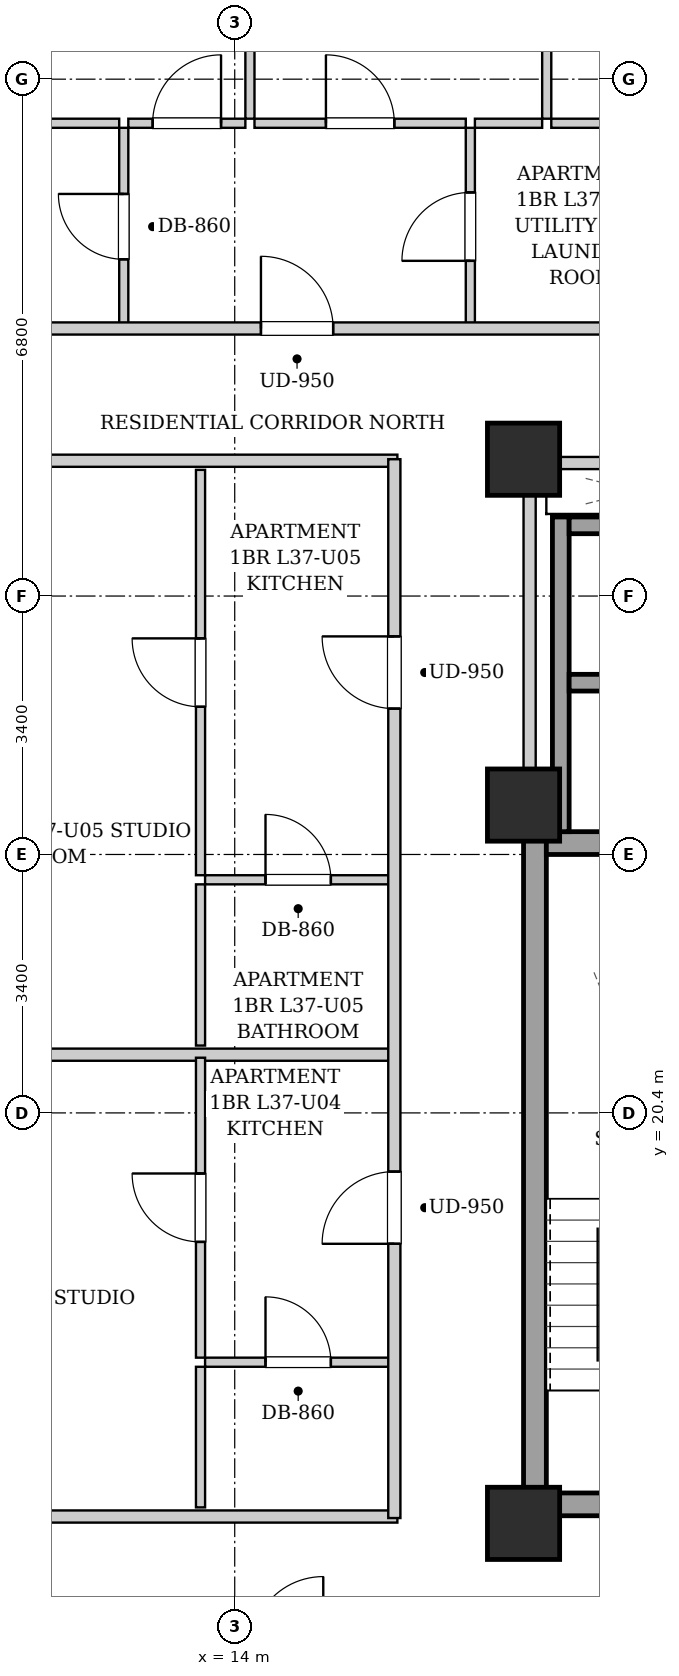
"""IFC4 building model, lengths in metres.
Left out: names, types, materials, properties, quantities, classifications, styles, units other than length and angle.
Written with IfcOpenShell. Run it as: python <this file> out.ifc"""

import sys

from ifc_helpers import new_model, si_unit, direction, frame, frame_2d, origin, origin_2d, place, context, subcontext, project, spatial, rectangle, extrude, element, fill, save


model = new_model("IFC4")
c1 = context("Model", 3, precision=1e-05, world=origin(), true_north=direction((0.0, 1.0)))
c2 = subcontext(c1, "Body", "Model", "MODEL_VIEW")
j1 = project(units=[si_unit("LENGTHUNIT", "METRE"), si_unit("PLANEANGLEUNIT", "RADIAN")], contexts=[c1])
p1 = place(None, origin())
s1 = spatial("IfcSite", under=j1, at=p1, CompositionType="ELEMENT")
p2 = place(p1, origin())
s2 = spatial("IfcBuilding", under=s1, at=p2, CompositionType="ELEMENT")
p3 = place(p2, frame((0.0, 0.0, 130.9)))
s3 = spatial("IfcBuildingStorey", under=s2, at=p3, CompositionType="ELEMENT", Elevation=130.9)
for number, where, z_axis, x_axis in (
    (1, (17.8, 15.0, 0.0), (0.0, 0.0, 1.0), (1.0, 0.0, 0.0)),
    (2, (17.8, 29.0, 0.0), (0.0, 0.0, 1.0), (1.0, 0.0, 0.0)),
    (3, (17.8, 24.45, 0.0), (0.0, 0.0, 1.0), (1.0, 0.0, 0.0)),
):
    element("IfcColumn", number, at=place(p3, frame(where, z_axis=z_axis, x_axis=x_axis)), inside=s3, PredefinedType="COLUMN", context=c2, shape_type="SweptSolid", body=[
        extrude(rectangle(XDim=0.95, YDim=0.95, at=origin_2d()), origin(), (0.0, 0.0, 1.0), 3.25),
    ])
p4 = place(p3, frame((17.95, 15.1, 0.0), z_axis=(0.0, 0.0, 1.0), x_axis=(0.0, 1.0, 0.0)))
e4 = element("IfcWall", 4, at=p4, inside=s3, PredefinedType="SHEAR", context=c2, shape_type="SweptSolid", body=[
    extrude(rectangle(XDim=9.0, YDim=0.3, at=frame_2d((4.5, 0.0))), origin(), (0.0, 0.0, 1.0), 2.99),
])
p5 = place(p3, frame((18.1, 23.95, 0.0), z_axis=(0.0, 0.0, 1.0), x_axis=(1.0, 0.0, 0.0)))
e5 = element("IfcWall", 5, at=p5, inside=s3, PredefinedType="SHEAR", context=c2, shape_type="SweptSolid", body=[
    extrude(rectangle(XDim=2.85, YDim=0.3, at=frame_2d((1.425, 0.0))), origin(), (0.0, 0.0, 1.0), 2.99),
])
p6 = place(p3, frame((18.1, 15.25, 0.0), z_axis=(0.0, 0.0, 1.0), x_axis=(1.0, 0.0, 0.0)))
e6 = element("IfcWall", 6, at=p6, inside=s3, PredefinedType="SHEAR", context=c2, shape_type="SweptSolid", body=[
    extrude(rectangle(XDim=2.85, YDim=0.3, at=frame_2d((1.425, 0.0))), origin(), (0.0, 0.0, 1.0), 2.99),
])
p7 = place(p6, frame((0.86, 0.0, 0.0)))
e7 = element("IfcOpeningElement", 7, at=p7, cuts=e6, PredefinedType="OPENING", context=c2, shape_type="SweptSolid", body=[
    extrude(rectangle(XDim=1.1, YDim=2.05, at=frame_2d((0.55, 1.025))), frame((0.0, 0.16, 0.0), z_axis=(0.0, -1.0, 0.0), x_axis=(1.0, 0.0, 0.0)), (0.0, 0.0, 1.0), 0.32),
])
p8 = place(p3, frame((18.29, 24.1, 0.0), z_axis=(0.0, 0.0, 1.0), x_axis=(0.0, 1.0, 0.0)))
e8 = element("IfcWall", 8, at=p8, inside=s3, PredefinedType="SHEAR", context=c2, shape_type="SweptSolid", body=[
    extrude(rectangle(XDim=4.14, YDim=0.22, at=frame_2d((2.07, 0.0))), origin(), (0.0, 0.0, 1.0), 2.99),
])
for number, where, z_axis, x_axis in (
    (9, (18.4, 26.06, 0.0), (0.0, 0.0, 1.0), (1.0, 0.0, 0.0)),
    (10, (18.4, 28.13, 0.0), (0.0, 0.0, 1.0), (1.0, 0.0, 0.0)),
):
    element("IfcWall", number, at=place(p3, frame(where, z_axis=z_axis, x_axis=x_axis)), inside=s3, PredefinedType="SHEAR", context=c2, shape_type="SweptSolid", body=[
        extrude(rectangle(XDim=1.9, YDim=0.22, at=frame_2d((0.95, 0.0))), origin(), (0.0, 0.0, 1.0), 2.99),
    ])
p9 = place(p3, frame((17.88, 24.12, 0.0), z_axis=(0.0, 0.0, 1.0), x_axis=(0.0, 1.0, 0.0)))
e11 = element("IfcWall", 11, at=p9, inside=s3, PredefinedType="PARTITIONING", context=c2, shape_type="SweptSolid", body=[
    extrude(rectangle(XDim=4.76, YDim=0.16, at=frame_2d((2.38, 0.0))), origin(), (0.0, 0.0, 1.0), 2.99),
])
p10 = place(p3, frame((17.96, 28.95, 0.0), z_axis=(0.0, 0.0, 1.0), x_axis=(1.0, 0.0, 0.0)))
e12 = element("IfcWall", 12, at=p10, inside=s3, PredefinedType="PARTITIONING", context=c2, shape_type="SweptSolid", body=[
    extrude(rectangle(XDim=4.29, YDim=0.16, at=frame_2d((2.145, 0.0))), origin(), (0.0, 0.0, 1.0), 2.426),
])
p11 = place(p10, frame((1.695, 0.0, 0.0)))
e13 = element("IfcOpeningElement", 13, at=p11, cuts=e12, PredefinedType="OPENING", context=c2, shape_type="SweptSolid", body=[
    extrude(rectangle(XDim=0.86, YDim=2.05, at=frame_2d((0.43, 1.025))), frame((0.0, 0.09, 0.0), z_axis=(0.0, -1.0, 0.0), x_axis=(1.0, 0.0, 0.0)), (0.0, 0.0, 1.0), 0.18),
])
for number, where, z_axis, x_axis in (
    (14, (7.78, 15.09, 0.0), (0.0, 0.0, 1.0), (1.0, 0.0, 0.0)),
    (15, (7.78, 28.98, 0.0), (0.0, 0.0, 1.0), (1.0, 0.0, 0.0)),
):
    element("IfcWall", number, at=place(p3, frame(where, z_axis=z_axis, x_axis=x_axis)), inside=s3, PredefinedType="PARTITIONING", context=c2, shape_type="SweptSolid", body=[
        extrude(rectangle(XDim=8.36, YDim=0.16, at=frame_2d((4.18, 0.0))), origin(), (0.0, 0.0, 1.0), 2.426),
    ])
p12 = place(p3, frame((12.54, 30.76, 0.0), z_axis=(0.0, 0.0, 1.0), x_axis=(0.0, 1.0, 0.0)))
e16 = element("IfcWall", 16, at=p12, inside=s3, PredefinedType="PARTITIONING", context=c2, shape_type="SweptSolid", body=[
    extrude(rectangle(XDim=2.6, YDim=0.12, at=frame_2d((1.3, 0.0))), origin(), (0.0, 0.0, 1.0), 2.99),
])
p13 = place(p12, frame((0.87, 0.0, 0.0)))
e17 = element("IfcOpeningElement", 17, at=p13, cuts=e16, PredefinedType="OPENING", context=c2, shape_type="SweptSolid", body=[
    extrude(rectangle(XDim=0.86, YDim=2.05, at=frame_2d((0.43, 1.025))), frame((0.0, 0.07, 0.0), z_axis=(0.0, -1.0, 0.0), x_axis=(1.0, 0.0, 0.0)), (0.0, 0.0, 1.0), 0.14),
])
p14 = place(p3, frame((10.08, 33.42, 0.0), z_axis=(0.0, 0.0, 1.0), x_axis=(1.0, 0.0, 0.0)))
e18 = element("IfcWall", 18, at=p14, inside=s3, PredefinedType="PARTITIONING", context=c2, shape_type="SweptSolid", body=[
    extrude(rectangle(XDim=2.4, YDim=0.12, at=frame_2d((1.2, 0.0))), origin(), (0.0, 0.0, 1.0), 2.99),
])
p15 = place(p3, frame((17.1, 30.76, 0.0), z_axis=(0.0, 0.0, 1.0), x_axis=(0.0, 1.0, 0.0)))
e19 = element("IfcWall", 19, at=p15, inside=s3, PredefinedType="PARTITIONING", context=c2, shape_type="SweptSolid", body=[
    extrude(rectangle(XDim=2.6, YDim=0.12, at=frame_2d((1.3, 0.0))), origin(), (0.0, 0.0, 1.0), 2.99),
])
p16 = place(p15, frame((0.85, 0.0, 0.0)))
e20 = element("IfcOpeningElement", 20, at=p16, cuts=e19, PredefinedType="OPENING", context=c2, shape_type="SweptSolid", body=[
    extrude(rectangle(XDim=0.9, YDim=2.05, at=frame_2d((0.45, 1.025))), frame((0.0, 0.07, 0.0), z_axis=(0.0, -1.0, 0.0), x_axis=(1.0, 0.0, 0.0)), (0.0, 0.0, 1.0), 0.14),
])
p17 = place(p3, frame((12.6, 33.42, 0.0), z_axis=(0.0, 0.0, 1.0), x_axis=(1.0, 0.0, 0.0)))
e21 = element("IfcWall", 21, at=p17, inside=s3, PredefinedType="PARTITIONING", context=c2, shape_type="SweptSolid", body=[
    extrude(rectangle(XDim=1.54, YDim=0.12, at=frame_2d((0.77, 0.0))), origin(), (0.0, 0.0, 1.0), 2.99),
])
p18 = place(p17, frame((0.32, 0.0, 0.0)))
e22 = element("IfcOpeningElement", 22, at=p18, cuts=e21, PredefinedType="OPENING", context=c2, shape_type="SweptSolid", body=[
    extrude(rectangle(XDim=0.9, YDim=2.05, at=frame_2d((0.45, 1.025))), frame((0.0, 0.07, 0.0), z_axis=(0.0, -1.0, 0.0), x_axis=(1.0, 0.0, 0.0)), (0.0, 0.0, 1.0), 0.14),
])
p19 = place(p3, frame((14.26, 33.42, 0.0), z_axis=(0.0, 0.0, 1.0), x_axis=(1.0, 0.0, 0.0)))
e23 = element("IfcWall", 23, at=p19, inside=s3, PredefinedType="PARTITIONING", context=c2, shape_type="SweptSolid", body=[
    extrude(rectangle(XDim=2.78, YDim=0.12, at=frame_2d((1.39, 0.0))), origin(), (0.0, 0.0, 1.0), 2.99),
])
p20 = place(p19, frame((0.94, 0.0, 0.0)))
e24 = element("IfcOpeningElement", 24, at=p20, cuts=e23, PredefinedType="OPENING", context=c2, shape_type="SweptSolid", body=[
    extrude(rectangle(XDim=0.9, YDim=2.05, at=frame_2d((0.45, 1.025))), frame((0.0, 0.07, 0.0), z_axis=(0.0, -1.0, 0.0), x_axis=(1.0, 0.0, 0.0)), (0.0, 0.0, 1.0), 0.14),
])
p21 = place(p3, frame((17.16, 33.42, 0.0), z_axis=(0.0, 0.0, 1.0), x_axis=(1.0, 0.0, 0.0)))
e25 = element("IfcWall", 25, at=p21, inside=s3, PredefinedType="PARTITIONING", context=c2, shape_type="SweptSolid", body=[
    extrude(rectangle(XDim=0.885, YDim=0.12, at=frame_2d((0.442, 0.0))), origin(), (0.0, 0.0, 1.0), 2.99),
])
p22 = place(p3, frame((18.165, 33.42, 0.0), z_axis=(0.0, 0.0, 1.0), x_axis=(1.0, 0.0, 0.0)))
e26 = element("IfcWall", 26, at=p22, inside=s3, PredefinedType="PARTITIONING", context=c2, shape_type="SweptSolid", body=[
    extrude(rectangle(XDim=2.595, YDim=0.12, at=frame_2d((1.297, 0.0))), origin(), (0.0, 0.0, 1.0), 2.99),
])
p23 = place(p22, frame((0.847, 0.0, 0.0)))
e27 = element("IfcOpeningElement", 27, at=p23, cuts=e26, PredefinedType="OPENING", context=c2, shape_type="SweptSolid", body=[
    extrude(rectangle(XDim=0.9, YDim=2.05, at=frame_2d((0.45, 1.025))), frame((0.0, 0.07, 0.0), z_axis=(0.0, -1.0, 0.0), x_axis=(1.0, 0.0, 0.0)), (0.0, 0.0, 1.0), 0.14),
])
p24 = place(p3, frame((14.2, 33.48, 0.0), z_axis=(0.0, 0.0, 1.0), x_axis=(0.0, 1.0, 0.0)))
e28 = element("IfcWall", 28, at=p24, inside=s3, PredefinedType="PARTITIONING", context=c2, shape_type="SweptSolid", body=[
    extrude(rectangle(XDim=9.54, YDim=0.12, at=frame_2d((4.77, 0.0))), origin(), (0.0, 0.0, 1.0), 2.99),
])
p25 = place(p24, frame((4.305, 0.0, 0.0)))
e29 = element("IfcOpeningElement", 29, at=p25, cuts=e28, PredefinedType="OPENING", context=c2, shape_type="SweptSolid", body=[
    extrude(rectangle(XDim=0.9, YDim=2.05, at=frame_2d((0.45, 1.025))), frame((0.0, 0.07, 0.0), z_axis=(0.0, -1.0, 0.0), x_axis=(1.0, 0.0, 0.0)), (0.0, 0.0, 1.0), 0.14),
])
p26 = place(p3, frame((18.105, 33.48, 0.0), z_axis=(0.0, 0.0, 1.0), x_axis=(0.0, 1.0, 0.0)))
e30 = element("IfcWall", 30, at=p26, inside=s3, PredefinedType="PARTITIONING", context=c2, shape_type="SweptSolid", body=[
    extrude(rectangle(XDim=9.54, YDim=0.12, at=frame_2d((4.77, 0.0))), origin(), (0.0, 0.0, 1.0), 2.99),
])
p27 = place(p26, frame((4.305, 0.0, 0.0)))
e31 = element("IfcOpeningElement", 31, at=p27, cuts=e30, PredefinedType="OPENING", context=c2, shape_type="SweptSolid", body=[
    extrude(rectangle(XDim=0.9, YDim=2.05, at=frame_2d((0.45, 1.025))), frame((0.0, 0.07, 0.0), z_axis=(0.0, -1.0, 0.0), x_axis=(1.0, 0.0, 0.0)), (0.0, 0.0, 1.0), 0.14),
])
p28 = place(p3, frame((7.78, 21.166, 0.0), z_axis=(0.0, 0.0, 1.0), x_axis=(1.0, 0.0, 0.0)))
e32 = element("IfcWall", 32, at=p28, inside=s3, PredefinedType="PARTITIONING", context=c2, shape_type="SweptSolid", body=[
    extrude(rectangle(XDim=8.28, YDim=0.16, at=frame_2d((4.14, 0.0))), origin(), (0.0, 0.0, 1.0), 2.99),
])
p29 = place(p3, frame((13.61, 17.12, 0.0), z_axis=(0.0, 0.0, 1.0), x_axis=(1.0, 0.0, 0.0)))
e33 = element("IfcWall", 33, at=p29, inside=s3, PredefinedType="PARTITIONING", context=c2, shape_type="SweptSolid", body=[
    extrude(rectangle(XDim=2.45, YDim=0.12, at=frame_2d((1.225, 0.0))), origin(), (0.0, 0.0, 1.0), 2.99),
])
p30 = place(p29, frame((0.795, 0.0, 0.0)))
e34 = element("IfcOpeningElement", 34, at=p30, cuts=e33, PredefinedType="OPENING", context=c2, shape_type="SweptSolid", body=[
    extrude(rectangle(XDim=0.86, YDim=2.05, at=frame_2d((0.43, 1.025))), frame((0.0, 0.07, 0.0), z_axis=(0.0, -1.0, 0.0), x_axis=(1.0, 0.0, 0.0)), (0.0, 0.0, 1.0), 0.14),
])
p31 = place(p3, frame((13.55, 15.21, 0.0), z_axis=(0.0, 0.0, 1.0), x_axis=(0.0, 1.0, 0.0)))
e35 = element("IfcWall", 35, at=p31, inside=s3, PredefinedType="PARTITIONING", context=c2, shape_type="SweptSolid", body=[
    extrude(rectangle(XDim=1.85, YDim=0.12, at=frame_2d((0.925, 0.0))), origin(), (0.0, 0.0, 1.0), 2.99),
])
p32 = place(p3, frame((13.55, 17.18, 0.0), z_axis=(0.0, 0.0, 1.0), x_axis=(0.0, 1.0, 0.0)))
e36 = element("IfcWall", 36, at=p32, inside=s3, PredefinedType="PARTITIONING", context=c2, shape_type="SweptSolid", body=[
    extrude(rectangle(XDim=3.946, YDim=0.12, at=frame_2d((1.973, 0.0))), origin(), (0.0, 0.0, 1.0), 2.99),
])
p33 = place(p32, frame((1.523, 0.0, 0.0)))
e37 = element("IfcOpeningElement", 37, at=p33, cuts=e36, PredefinedType="OPENING", context=c2, shape_type="SweptSolid", body=[
    extrude(rectangle(XDim=0.9, YDim=2.05, at=frame_2d((0.45, 1.025))), frame((0.0, 0.07, 0.0), z_axis=(0.0, -1.0, 0.0), x_axis=(1.0, 0.0, 0.0)), (0.0, 0.0, 1.0), 0.14),
])
p34 = place(p3, frame((13.61, 23.467, 0.0), z_axis=(0.0, 0.0, 1.0), x_axis=(1.0, 0.0, 0.0)))
e38 = element("IfcWall", 38, at=p34, inside=s3, PredefinedType="PARTITIONING", context=c2, shape_type="SweptSolid", body=[
    extrude(rectangle(XDim=2.45, YDim=0.12, at=frame_2d((1.225, 0.0))), origin(), (0.0, 0.0, 1.0), 2.99),
])
p35 = place(p34, frame((0.795, 0.0, 0.0)))
e39 = element("IfcOpeningElement", 39, at=p35, cuts=e38, PredefinedType="OPENING", context=c2, shape_type="SweptSolid", body=[
    extrude(rectangle(XDim=0.86, YDim=2.05, at=frame_2d((0.43, 1.025))), frame((0.0, 0.07, 0.0), z_axis=(0.0, -1.0, 0.0), x_axis=(1.0, 0.0, 0.0)), (0.0, 0.0, 1.0), 0.14),
])
p36 = place(p3, frame((13.55, 21.286, 0.0), z_axis=(0.0, 0.0, 1.0), x_axis=(0.0, 1.0, 0.0)))
e40 = element("IfcWall", 40, at=p36, inside=s3, PredefinedType="PARTITIONING", context=c2, shape_type="SweptSolid", body=[
    extrude(rectangle(XDim=2.121, YDim=0.12, at=frame_2d((1.061, 0.0))), origin(), (0.0, 0.0, 1.0), 2.99),
])
p37 = place(p3, frame((13.55, 23.527, 0.0), z_axis=(0.0, 0.0, 1.0), x_axis=(0.0, 1.0, 0.0)))
e41 = element("IfcWall", 41, at=p37, inside=s3, PredefinedType="PARTITIONING", context=c2, shape_type="SweptSolid", body=[
    extrude(rectangle(XDim=5.333, YDim=0.12, at=frame_2d((2.667, 0.0))), origin(), (0.0, 0.0, 1.0), 2.99),
])
p38 = place(p37, frame((2.216, 0.0, 0.0)))
e42 = element("IfcOpeningElement", 42, at=p38, cuts=e41, PredefinedType="OPENING", context=c2, shape_type="SweptSolid", body=[
    extrude(rectangle(XDim=0.9, YDim=2.05, at=frame_2d((0.45, 1.025))), frame((0.0, 0.07, 0.0), z_axis=(0.0, -1.0, 0.0), x_axis=(1.0, 0.0, 0.0)), (0.0, 0.0, 1.0), 0.14),
])
p39 = place(p3, frame((10.05, 30.72, 0.0), z_axis=(0.0, 0.0, 1.0), x_axis=(1.0, 0.0, 0.0)))
e43 = element("IfcWall", 43, at=p39, inside=s3, PredefinedType="PARTITIONING", context=c2, shape_type="SweptSolid", body=[
    extrude(rectangle(XDim=27.7, YDim=0.16, at=frame_2d((13.85, 0.0))), origin(), (0.0, 0.0, 1.0), 2.99),
])
p40 = place(p39, frame((4.295, 0.0, 0.0)))
e44 = element("IfcOpeningElement", 44, at=p40, cuts=e43, PredefinedType="OPENING", context=c2, shape_type="SweptSolid", body=[
    extrude(rectangle(XDim=0.95, YDim=2.1, at=frame_2d((0.475, 1.05))), frame((0.0, 0.09, 0.0), z_axis=(0.0, -1.0, 0.0), x_axis=(1.0, 0.0, 0.0)), (0.0, 0.0, 1.0), 0.18),
])
p41 = place(p39, frame((23.785, 0.0, 0.0)))
e45 = element("IfcOpeningElement", 45, at=p41, cuts=e43, PredefinedType="OPENING", context=c2, shape_type="SweptSolid", body=[
    extrude(rectangle(XDim=0.95, YDim=2.1, at=frame_2d((0.475, 1.05))), frame((0.0, 0.09, 0.0), z_axis=(0.0, -1.0, 0.0), x_axis=(1.0, 0.0, 0.0)), (0.0, 0.0, 1.0), 0.18),
])
p42 = place(p3, frame((16.1, 15.07, 0.0), z_axis=(0.0, 0.0, 1.0), x_axis=(0.0, 1.0, 0.0)))
e46 = element("IfcWall", 46, at=p42, inside=s3, PredefinedType="PARTITIONING", context=c2, shape_type="SweptSolid", body=[
    extrude(rectangle(XDim=13.93, YDim=0.16, at=frame_2d((6.965, 0.0))), origin(), (0.0, 0.0, 1.0), 2.99),
])
p43 = place(p42, frame((3.608, 0.0, 0.0)))
e47 = element("IfcOpeningElement", 47, at=p43, cuts=e46, PredefinedType="OPENING", context=c2, shape_type="SweptSolid", body=[
    extrude(rectangle(XDim=0.95, YDim=2.1, at=frame_2d((0.475, 1.05))), frame((0.0, 0.09, 0.0), z_axis=(0.0, -1.0, 0.0), x_axis=(1.0, 0.0, 0.0)), (0.0, 0.0, 1.0), 0.18),
])
p44 = place(p42, frame((10.649, 0.0, 0.0)))
e48 = element("IfcOpeningElement", 48, at=p44, cuts=e46, PredefinedType="OPENING", context=c2, shape_type="SweptSolid", body=[
    extrude(rectangle(XDim=0.95, YDim=2.1, at=frame_2d((0.475, 1.05))), frame((0.0, 0.09, 0.0), z_axis=(0.0, -1.0, 0.0), x_axis=(1.0, 0.0, 0.0)), (0.0, 0.0, 1.0), 0.18),
])
p45 = place(p13, origin())
e49 = element("IfcDoor", 49, at=p45, inside=s3, OperationType="SINGLE_SWING_RIGHT", PredefinedType="DOOR", context=c2, shape_type="SweptSolid", body=[
    extrude(rectangle(XDim=0.86, YDim=2.05, at=frame_2d((0.43, 1.025))), frame((0.0, 0.025, 0.0), z_axis=(0.0, -1.0, 0.0), x_axis=(1.0, 0.0, 0.0)), (0.0, 0.0, 1.0), 0.05),
])
fill(e17, e49)
p46 = place(p16, origin())
e50 = element("IfcDoor", 50, at=p46, inside=s3, OperationType="SINGLE_SWING_LEFT", PredefinedType="DOOR", context=c2, shape_type="SweptSolid", body=[
    extrude(rectangle(XDim=0.9, YDim=2.05, at=frame_2d((0.45, 1.025))), frame((0.0, 0.025, 0.0), z_axis=(0.0, -1.0, 0.0), x_axis=(1.0, 0.0, 0.0)), (0.0, 0.0, 1.0), 0.05),
])
fill(e20, e50)
p47 = place(p18, origin())
e51 = element("IfcDoor", 51, at=p47, inside=s3, OperationType="SINGLE_SWING_RIGHT", PredefinedType="DOOR", context=c2, shape_type="SweptSolid", body=[
    extrude(rectangle(XDim=0.9, YDim=2.05, at=frame_2d((0.45, 1.025))), frame((0.0, 0.025, 0.0), z_axis=(0.0, -1.0, 0.0), x_axis=(1.0, 0.0, 0.0)), (0.0, 0.0, 1.0), 0.05),
])
fill(e22, e51)
p48 = place(p20, origin())
e52 = element("IfcDoor", 52, at=p48, inside=s3, OperationType="SINGLE_SWING_LEFT", PredefinedType="DOOR", context=c2, shape_type="SweptSolid", body=[
    extrude(rectangle(XDim=0.9, YDim=2.05, at=frame_2d((0.45, 1.025))), frame((0.0, 0.025, 0.0), z_axis=(0.0, -1.0, 0.0), x_axis=(1.0, 0.0, 0.0)), (0.0, 0.0, 1.0), 0.05),
])
fill(e24, e52)
p49 = place(p30, origin())
e53 = element("IfcDoor", 53, at=p49, inside=s3, OperationType="SINGLE_SWING_LEFT", PredefinedType="DOOR", context=c2, shape_type="SweptSolid", body=[
    extrude(rectangle(XDim=0.86, YDim=2.05, at=frame_2d((0.43, 1.025))), frame((0.0, 0.025, 0.0), z_axis=(0.0, -1.0, 0.0), x_axis=(1.0, 0.0, 0.0)), (0.0, 0.0, 1.0), 0.05),
])
fill(e34, e53)
p50 = place(p33, origin())
e54 = element("IfcDoor", 54, at=p50, inside=s3, OperationType="SINGLE_SWING_RIGHT", PredefinedType="DOOR", context=c2, shape_type="SweptSolid", body=[
    extrude(rectangle(XDim=0.9, YDim=2.05, at=frame_2d((0.45, 1.025))), frame((0.0, 0.025, 0.0), z_axis=(0.0, -1.0, 0.0), x_axis=(1.0, 0.0, 0.0)), (0.0, 0.0, 1.0), 0.05),
])
fill(e37, e54)
p51 = place(p35, origin())
e55 = element("IfcDoor", 55, at=p51, inside=s3, OperationType="SINGLE_SWING_LEFT", PredefinedType="DOOR", context=c2, shape_type="SweptSolid", body=[
    extrude(rectangle(XDim=0.86, YDim=2.05, at=frame_2d((0.43, 1.025))), frame((0.0, 0.025, 0.0), z_axis=(0.0, -1.0, 0.0), x_axis=(1.0, 0.0, 0.0)), (0.0, 0.0, 1.0), 0.05),
])
fill(e39, e55)
p52 = place(p38, origin())
e56 = element("IfcDoor", 56, at=p52, inside=s3, OperationType="SINGLE_SWING_RIGHT", PredefinedType="DOOR", context=c2, shape_type="SweptSolid", body=[
    extrude(rectangle(XDim=0.9, YDim=2.05, at=frame_2d((0.45, 1.025))), frame((0.0, 0.025, 0.0), z_axis=(0.0, -1.0, 0.0), x_axis=(1.0, 0.0, 0.0)), (0.0, 0.0, 1.0), 0.05),
])
fill(e42, e56)
p53 = place(p40, origin())
e57 = element("IfcDoor", 57, at=p53, inside=s3, OperationType="SINGLE_SWING_LEFT", PredefinedType="DOOR", context=c2, shape_type="SweptSolid", body=[
    extrude(rectangle(XDim=0.95, YDim=2.1, at=frame_2d((0.475, 1.05))), frame((0.0, 0.025, 0.0), z_axis=(0.0, -1.0, 0.0), x_axis=(1.0, 0.0, 0.0)), (0.0, 0.0, 1.0), 0.05),
])
fill(e44, e57)
p54 = place(p43, origin())
e58 = element("IfcDoor", 58, at=p54, inside=s3, OperationType="SINGLE_SWING_LEFT", PredefinedType="DOOR", context=c2, shape_type="SweptSolid", body=[
    extrude(rectangle(XDim=0.95, YDim=2.1, at=frame_2d((0.475, 1.05))), frame((0.0, 0.025, 0.0), z_axis=(0.0, -1.0, 0.0), x_axis=(1.0, 0.0, 0.0)), (0.0, 0.0, 1.0), 0.05),
])
fill(e47, e58)
p55 = place(p44, origin())
e59 = element("IfcDoor", 59, at=p55, inside=s3, OperationType="SINGLE_SWING_RIGHT", PredefinedType="DOOR", context=c2, shape_type="SweptSolid", body=[
    extrude(rectangle(XDim=0.95, YDim=2.1, at=frame_2d((0.475, 1.05))), frame((0.0, 0.025, 0.0), z_axis=(0.0, -1.0, 0.0), x_axis=(1.0, 0.0, 0.0)), (0.0, 0.0, 1.0), 0.05),
])
fill(e48, e59)
save(model, sys.argv[1])
